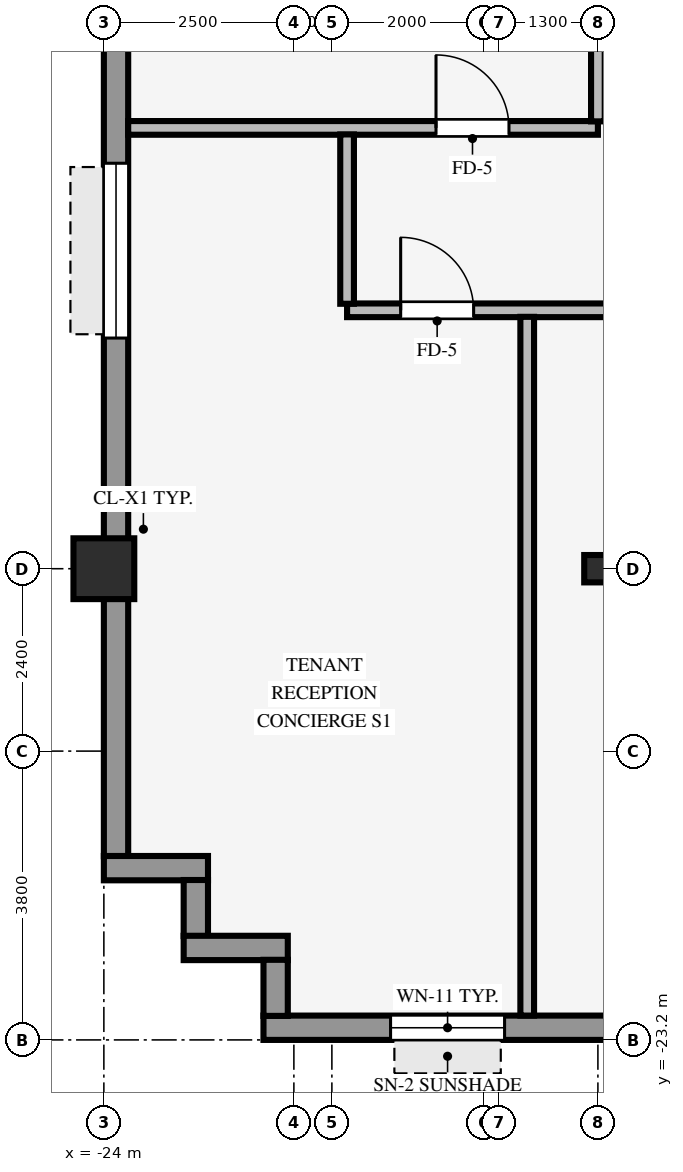
"""IFC4 building model, lengths in metres.
Left out: names, types, materials, properties, quantities, classifications, styles, units other than length and angle.
Written with IfcOpenShell. Run it as: python <this file> out.ifc"""

import sys

from ifc_helpers import new_model, si_unit, direction, frame, frame_2d, origin, origin_2d, place, context, subcontext, project, spatial, rectangle, hollow_rectangle, i_section, extrude, source, transform, mapped, element, fill, save


model = new_model("IFC4")
c1 = context("Model", 3, precision=1e-05, world=origin(), true_north=direction((0.0, 1.0)))
c2 = subcontext(c1, "Body", "Model", "MODEL_VIEW")
j1 = project(units=[si_unit("LENGTHUNIT", "METRE"), si_unit("PLANEANGLEUNIT", "RADIAN")], contexts=[c1])
p1 = place(None, origin())
s1 = spatial("IfcSite", under=j1, at=p1, CompositionType="ELEMENT")
p2 = place(p1, origin())
s2 = spatial("IfcBuilding", under=s1, at=p2, CompositionType="ELEMENT")
p3 = place(p2, frame((0.0, 0.0, 89.65)))
s3 = spatial("IfcBuildingStorey", under=s2, at=p3, CompositionType="ELEMENT", Elevation=89.65)
p4 = place(p3, frame((-24.0, -17.0, 0.0), z_axis=(0.0, 0.0, 1.0), x_axis=(1.0, 0.0, 0.0)))
e1 = element("IfcColumn", 1, at=p4, inside=s3, PredefinedType="COLUMN", context=c2, shape_type="SweptSolid", body=[
    extrude(hollow_rectangle(XDim=0.8, YDim=0.8, WallThickness=0.055, InnerFilletRadius=0.055, OuterFilletRadius=0.11, at=origin_2d()), origin(), (0.0, 0.0, 1.0), 3.25),
])
p5 = place(p3, frame((-17.5, -17.0, 0.0), z_axis=(0.0, 0.0, 1.0), x_axis=(1.0, 0.0, 0.0)))
e2 = element("IfcColumn", 2, at=p5, inside=s3, PredefinedType="COLUMN", context=c2, shape_type="SweptSolid", body=[
    extrude(i_section(OverallWidth=0.36, OverallDepth=0.36, WebThickness=0.021, FlangeThickness=0.021, FilletRadius=0.018, at=origin_2d()), origin(), (0.0, 0.0, 1.0), 3.25),
])
p6 = place(p3, frame((-21.9, -23.04, 0.0), z_axis=(0.0, 0.0, 1.0), x_axis=(1.0, 0.0, 0.0)))
e3 = element("IfcWall", 3, at=p6, inside=s3, PredefinedType="STANDARD", context=c2, shape_type="SweptSolid", body=[
    extrude(rectangle(XDim=43.8, YDim=0.32, at=frame_2d((21.9, 0.0))), origin(), (0.0, 0.0, 1.0), 2.585),
])
p7 = place(p6, frame((1.672, 0.0, 0.8)))
e4 = element("IfcOpeningElement", 4, at=p7, cuts=e3, PredefinedType="OPENING", context=c2, shape_type="SweptSolid", body=[
    extrude(rectangle(XDim=1.5, YDim=1.6, at=frame_2d((0.75, 0.8))), frame((0.0, 0.17, 0.0), z_axis=(0.0, -1.0, 0.0), x_axis=(1.0, 0.0, 0.0)), (0.0, 0.0, 1.0), 0.34),
])
p8 = place(p6, frame((6.317, 0.0, 0.8)))
e5 = element("IfcOpeningElement", 5, at=p8, cuts=e3, PredefinedType="OPENING", context=c2, shape_type="SweptSolid", body=[
    extrude(rectangle(XDim=1.5, YDim=1.6, at=frame_2d((0.75, 0.8))), frame((0.0, 0.17, 0.0), z_axis=(0.0, -1.0, 0.0), x_axis=(1.0, 0.0, 0.0)), (0.0, 0.0, 1.0), 0.34),
])
p9 = place(p6, frame((17.856, 0.0, 0.8)))
e6 = element("IfcOpeningElement", 6, at=p9, cuts=e3, PredefinedType="OPENING", context=c2, shape_type="SweptSolid", body=[
    extrude(rectangle(XDim=1.5, YDim=1.6, at=frame_2d((0.75, 0.8))), frame((0.0, 0.17, 0.0), z_axis=(0.0, -1.0, 0.0), x_axis=(1.0, 0.0, 0.0)), (0.0, 0.0, 1.0), 0.34),
])
p10 = place(p6, frame((25.794, 0.0, 0.8)))
e7 = element("IfcOpeningElement", 7, at=p10, cuts=e3, PredefinedType="OPENING", context=c2, shape_type="SweptSolid", body=[
    extrude(rectangle(XDim=1.5, YDim=1.6, at=frame_2d((0.75, 0.8))), frame((0.0, 0.17, 0.0), z_axis=(0.0, -1.0, 0.0), x_axis=(1.0, 0.0, 0.0)), (0.0, 0.0, 1.0), 0.34),
])
p11 = place(p6, frame((31.789, 0.0, 0.8)))
e8 = element("IfcOpeningElement", 8, at=p11, cuts=e3, PredefinedType="OPENING", context=c2, shape_type="SweptSolid", body=[
    extrude(rectangle(XDim=1.5, YDim=1.6, at=frame_2d((0.75, 0.8))), frame((0.0, 0.17, 0.0), z_axis=(0.0, -1.0, 0.0), x_axis=(1.0, 0.0, 0.0)), (0.0, 0.0, 1.0), 0.34),
])
p12 = place(p6, frame((35.083, 0.0, 0.8)))
e9 = element("IfcOpeningElement", 9, at=p12, cuts=e3, PredefinedType="OPENING", context=c2, shape_type="SweptSolid", body=[
    extrude(rectangle(XDim=1.5, YDim=1.6, at=frame_2d((0.75, 0.8))), frame((0.0, 0.17, 0.0), z_axis=(0.0, -1.0, 0.0), x_axis=(1.0, 0.0, 0.0)), (0.0, 0.0, 1.0), 0.34),
])
p13 = place(p6, frame((39.728, 0.0, 0.8)))
e10 = element("IfcOpeningElement", 10, at=p13, cuts=e3, PredefinedType="OPENING", context=c2, shape_type="SweptSolid", body=[
    extrude(rectangle(XDim=1.5, YDim=1.6, at=frame_2d((0.75, 0.8))), frame((0.0, 0.17, 0.0), z_axis=(0.0, -1.0, 0.0), x_axis=(1.0, 0.0, 0.0)), (0.0, 0.0, 1.0), 0.34),
])
p14 = place(p3, frame((-23.84, -20.784, 0.0), z_axis=(0.0, 0.0, 1.0), x_axis=(0.0, 1.0, 0.0)))
e11 = element("IfcWall", 11, at=p14, inside=s3, PredefinedType="STANDARD", context=c2, shape_type="SweptSolid", body=[
    extrude(rectangle(XDim=41.568, YDim=0.32, at=frame_2d((20.784, 0.0))), origin(), (0.0, 0.0, 1.0), 2.585),
])
p15 = place(p14, frame((15.384, 0.0, 0.0)))
e12 = element("IfcOpeningElement", 12, at=p15, cuts=e11, PredefinedType="OPENING", context=c2, shape_type="SweptSolid", body=[
    extrude(rectangle(XDim=1.05, YDim=2.1, at=frame_2d((0.525, 1.05))), frame((0.0, 0.17, 0.0), z_axis=(0.0, -1.0, 0.0), x_axis=(1.0, 0.0, 0.0)), (0.0, 0.0, 1.0), 0.34),
])
p16 = place(p14, frame((6.819, 0.0, 0.8)))
e13 = element("IfcOpeningElement", 13, at=p16, cuts=e11, PredefinedType="OPENING", context=c2, shape_type="SweptSolid", body=[
    extrude(rectangle(XDim=2.3, YDim=1.62, at=frame_2d((1.15, 0.81))), frame((0.0, 0.17, 0.0), z_axis=(0.0, -1.0, 0.0), x_axis=(1.0, 0.0, 0.0)), (0.0, 0.0, 1.0), 0.34),
])
p17 = place(p14, frame((12.215, 0.0, 0.8)))
e14 = element("IfcOpeningElement", 14, at=p17, cuts=e11, PredefinedType="OPENING", context=c2, shape_type="SweptSolid", body=[
    extrude(rectangle(XDim=2.3, YDim=1.62, at=frame_2d((1.15, 0.81))), frame((0.0, 0.17, 0.0), z_axis=(0.0, -1.0, 0.0), x_axis=(1.0, 0.0, 0.0)), (0.0, 0.0, 1.0), 0.34),
])
p18 = place(p14, frame((22.107, 0.0, 0.8)))
e15 = element("IfcOpeningElement", 15, at=p18, cuts=e11, PredefinedType="OPENING", context=c2, shape_type="SweptSolid", body=[
    extrude(rectangle(XDim=2.3, YDim=1.62, at=frame_2d((1.15, 0.81))), frame((0.0, 0.17, 0.0), z_axis=(0.0, -1.0, 0.0), x_axis=(1.0, 0.0, 0.0)), (0.0, 0.0, 1.0), 0.34),
])
p19 = place(p14, frame((27.053, 0.0, 0.8)))
e16 = element("IfcOpeningElement", 16, at=p19, cuts=e11, PredefinedType="OPENING", context=c2, shape_type="SweptSolid", body=[
    extrude(rectangle(XDim=2.3, YDim=1.62, at=frame_2d((1.15, 0.81))), frame((0.0, 0.17, 0.0), z_axis=(0.0, -1.0, 0.0), x_axis=(1.0, 0.0, 0.0)), (0.0, 0.0, 1.0), 0.34),
])
p20 = place(p14, frame((32.449, 0.0, 0.8)))
e17 = element("IfcOpeningElement", 17, at=p20, cuts=e11, PredefinedType="OPENING", context=c2, shape_type="SweptSolid", body=[
    extrude(rectangle(XDim=2.3, YDim=1.62, at=frame_2d((1.15, 0.81))), frame((0.0, 0.17, 0.0), z_axis=(0.0, -1.0, 0.0), x_axis=(1.0, 0.0, 0.0)), (0.0, 0.0, 1.0), 0.34),
])
p21 = place(p3, frame((-24.0, -20.94, 0.0), z_axis=(0.0, 0.0, 1.0), x_axis=(1.0, 0.0, 0.0)))
e18 = element("IfcWall", 18, at=p21, inside=s3, PredefinedType="STANDARD", context=c2, shape_type="SweptSolid", body=[
    extrude(rectangle(XDim=1.37, YDim=0.32, at=frame_2d((0.685, 0.0))), origin(), (0.0, 0.0, 1.0), 3.24),
])
p22 = place(p3, frame((-22.79, -21.834, 0.0), z_axis=(0.0, 0.0, 1.0), x_axis=(0.0, 1.0, 0.0)))
e19 = element("IfcWall", 19, at=p22, inside=s3, PredefinedType="STANDARD", context=c2, shape_type="SweptSolid", body=[
    extrude(rectangle(XDim=0.738, YDim=0.32, at=frame_2d((0.369, 0.0))), origin(), (0.0, 0.0, 1.0), 3.24),
])
p23 = place(p3, frame((-22.95, -21.99, 0.0), z_axis=(0.0, 0.0, 1.0), x_axis=(1.0, 0.0, 0.0)))
e20 = element("IfcWall", 20, at=p23, inside=s3, PredefinedType="STANDARD", context=c2, shape_type="SweptSolid", body=[
    extrude(rectangle(XDim=1.37, YDim=0.32, at=frame_2d((0.685, 0.0))), origin(), (0.0, 0.0, 1.0), 3.24),
])
p24 = place(p3, frame((-21.74, -22.884, 0.0), z_axis=(0.0, 0.0, 1.0), x_axis=(0.0, 1.0, 0.0)))
e21 = element("IfcWall", 21, at=p24, inside=s3, PredefinedType="STANDARD", context=c2, shape_type="SweptSolid", body=[
    extrude(rectangle(XDim=0.738, YDim=0.32, at=frame_2d((0.369, 0.0))), origin(), (0.0, 0.0, 1.0), 3.24),
])
p25 = place(p3, frame((-20.8, -13.6, 0.0), z_axis=(0.0, 0.0, 1.0), x_axis=(1.0, 0.0, 0.0)))
e22 = element("IfcWall", 22, at=p25, inside=s3, PredefinedType="PARTITIONING", context=c2, shape_type="SweptSolid", body=[
    extrude(rectangle(XDim=5.8, YDim=0.18, at=frame_2d((2.9, 0.0))), origin(), (0.0, 0.0, 1.0), 2.878),
])
p26 = place(p25, frame((3.605, 0.0, 0.0)))
e23 = element("IfcOpeningElement", 23, at=p26, cuts=e22, PredefinedType="OPENING", context=c2, shape_type="SweptSolid", body=[
    extrude(rectangle(XDim=0.96, YDim=2.1, at=frame_2d((0.48, 1.05))), frame((0.0, 0.1, 0.0), z_axis=(0.0, -1.0, 0.0), x_axis=(1.0, 0.0, 0.0)), (0.0, 0.0, 1.0), 0.2),
])
p27 = place(p25, frame((0.705, 0.0, 0.0)))
e24 = element("IfcOpeningElement", 24, at=p27, cuts=e22, PredefinedType="OPENING", context=c2, shape_type="SweptSolid", body=[
    extrude(rectangle(XDim=0.96, YDim=2.1, at=frame_2d((0.48, 1.05))), frame((0.0, 0.1, 0.0), z_axis=(0.0, -1.0, 0.0), x_axis=(1.0, 0.0, 0.0)), (0.0, 0.0, 1.0), 0.2),
])
p28 = place(p3, frame((-23.68, -11.2, 0.0), z_axis=(0.0, 0.0, 1.0), x_axis=(1.0, 0.0, 0.0)))
e25 = element("IfcWall", 25, at=p28, inside=s3, PredefinedType="PARTITIONING", context=c2, shape_type="SweptSolid", body=[
    extrude(rectangle(XDim=6.18, YDim=0.18, at=frame_2d((3.09, 0.0))), origin(), (0.0, 0.0, 1.0), 3.24),
])
p29 = place(p28, frame((4.05, 0.0, 0.0)))
e26 = element("IfcOpeningElement", 26, at=p29, cuts=e25, PredefinedType="OPENING", context=c2, shape_type="SweptSolid", body=[
    extrude(rectangle(XDim=0.96, YDim=2.1, at=frame_2d((0.48, 1.05))), frame((0.0, 0.1, 0.0), z_axis=(0.0, -1.0, 0.0), x_axis=(1.0, 0.0, 0.0)), (0.0, 0.0, 1.0), 0.2),
])
p30 = place(p3, frame((-20.8, -13.514, 0.0), z_axis=(0.0, 0.0, 1.0), x_axis=(0.0, 1.0, 0.0)))
e27 = element("IfcWall", 27, at=p30, inside=s3, PredefinedType="PARTITIONING", context=c2, shape_type="SweptSolid", body=[
    extrude(rectangle(XDim=2.228, YDim=0.18, at=frame_2d((1.114, 0.0))), origin(), (0.0, 0.0, 1.0), 3.24),
])
p31 = place(p3, frame((-18.43, -22.88, 0.0), z_axis=(0.0, 0.0, 1.0), x_axis=(0.0, 1.0, 0.0)))
e28 = element("IfcWall", 28, at=p31, inside=s3, PredefinedType="PARTITIONING", context=c2, shape_type="SweptSolid", body=[
    extrude(rectangle(XDim=9.194, YDim=0.18, at=frame_2d((4.597, 0.0))), origin(), (0.0, 0.0, 1.0), 3.24),
])
p32 = place(p3, frame((-17.5, -11.114, 0.0), z_axis=(0.0, 0.0, 1.0), x_axis=(0.0, 1.0, 0.0)))
e29 = element("IfcWall", 29, at=p32, inside=s3, PredefinedType="PARTITIONING", context=c2, shape_type="SweptSolid", body=[
    extrude(rectangle(XDim=0.968, YDim=0.18, at=frame_2d((0.484, 0.0))), origin(), (0.0, 0.0, 1.0), 2.335),
])
m1 = source(origin(), c2, "Body", "SweptSolid", [
    extrude(rectangle(XDim=1.5, YDim=1.6, at=frame_2d((0.75, 0.8))), frame((0.0, 0.03, 0.0), z_axis=(0.0, -1.0, 0.0), x_axis=(1.0, 0.0, 0.0)), (0.0, 0.0, 1.0), 0.06),
])
p33 = place(p7, origin())
e30 = element("IfcWindow", 30, at=p33, inside=s3, PartitioningType="SINGLE_PANEL", PredefinedType="WINDOW", context=c2, shape_type="MappedRepresentation", body=[
    mapped(m1, transform((0.0, 0.0, 0.0), scale=1.0)),
])
fill(e4, e30)
m2 = source(origin(), c2, "Body", "SweptSolid", [
    extrude(rectangle(XDim=2.3, YDim=1.62, at=frame_2d((1.15, 0.81))), frame((0.0, 0.03, 0.0), z_axis=(0.0, -1.0, 0.0), x_axis=(1.0, 0.0, 0.0)), (0.0, 0.0, 1.0), 0.06),
])
p34 = place(p16, origin())
e31 = element("IfcWindow", 31, at=p34, inside=s3, PartitioningType="SINGLE_PANEL", PredefinedType="WINDOW", context=c2, shape_type="MappedRepresentation", body=[
    mapped(m2, transform((0.0, 0.0, 0.0), scale=1.0)),
])
fill(e13, e31)
m3 = source(origin(), c2, "Body", "SweptSolid", [
    extrude(rectangle(XDim=0.96, YDim=2.1, at=frame_2d((0.48, 1.05))), frame((0.0, 0.025, 0.0), z_axis=(0.0, -1.0, 0.0), x_axis=(1.0, 0.0, 0.0)), (0.0, 0.0, 1.0), 0.05),
])
p35 = place(p29, origin())
e32 = element("IfcDoor", 32, at=p35, inside=s3, OperationType="SINGLE_SWING_LEFT", PredefinedType="DOOR", context=c2, shape_type="MappedRepresentation", body=[
    mapped(m3, transform((0.0, 0.0, 0.0), scale=1.0)),
])
fill(e26, e32)
p36 = place(p27, origin())
e33 = element("IfcDoor", 33, at=p36, inside=s3, OperationType="SINGLE_SWING_LEFT", PredefinedType="DOOR", context=c2, shape_type="MappedRepresentation", body=[
    mapped(m3, transform((0.0, 0.0, 0.0), scale=1.0)),
])
fill(e24, e33)
save(model, sys.argv[1])
